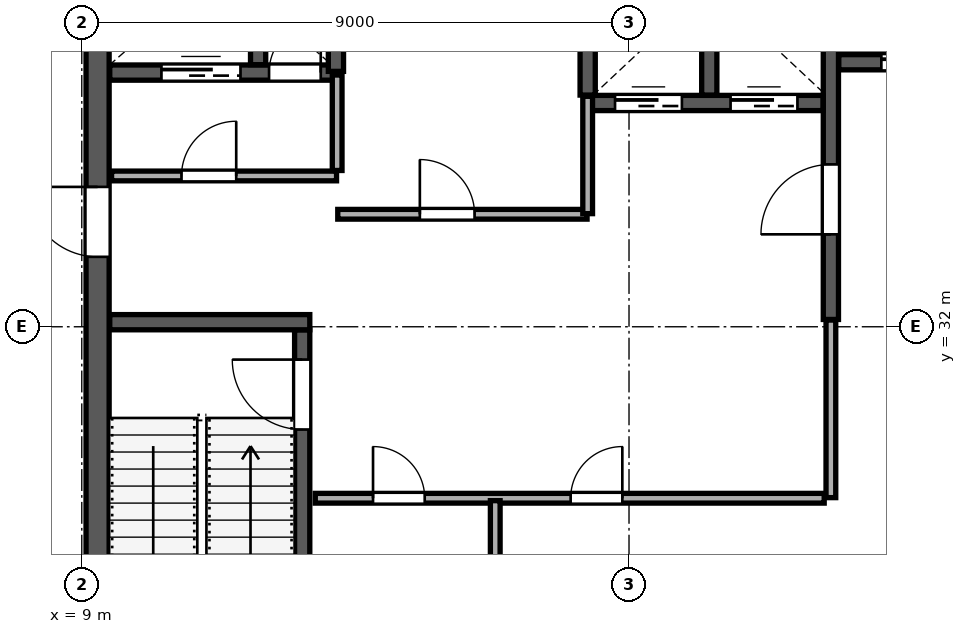
"""IFC4 building model, lengths in metres.
Left out: names, types, materials, properties, quantities, classifications, styles, units other than length and angle.
Written with IfcOpenShell. Run it as: python <this file> out.ifc"""

import sys

from ifc_helpers import new_model, si_unit, direction, frame, frame_2d, origin, place, context, subcontext, project, spatial, rectangle, extrude, source, transform, mapped, element, fill, save


model = new_model("IFC4")
c1 = context("Model", 3, precision=1e-05, world=origin(), true_north=direction((0.0, 1.0)))
c2 = subcontext(c1, "Body", "Model", "MODEL_VIEW")
j1 = project(units=[si_unit("LENGTHUNIT", "METRE"), si_unit("PLANEANGLEUNIT", "RADIAN")], contexts=[c1])
p1 = place(None, origin())
s1 = spatial("IfcSite", under=j1, at=p1, CompositionType="ELEMENT")
p2 = place(p1, origin())
s2 = spatial("IfcBuilding", under=s1, at=p2, CompositionType="ELEMENT")
p3 = place(p2, frame((0.0, 0.0, 324.0)))
s3 = spatial("IfcBuildingStorey", under=s2, at=p3, CompositionType="ELEMENT", Elevation=324.0)
p4 = place(p3, frame((9.26, 24.45, 0.0), z_axis=(0.0, 0.0, 1.0), x_axis=(0.0, 1.0, 0.0)))
e1 = element("IfcWall", 1, at=p4, inside=s3, PredefinedType="SHEAR", context=c2, shape_type="SweptSolid", body=[
    extrude(rectangle(XDim=15.1, YDim=0.38, at=frame_2d((7.55, 0.0))), origin(), (0.0, 0.0, 1.0), 3.96),
])
p5 = place(p4, frame((8.7, 0.0, 0.0)))
e2 = element("IfcOpeningElement", 2, at=p5, cuts=e1, PredefinedType="OPENING", context=c2, shape_type="SweptSolid", body=[
    extrude(rectangle(XDim=1.15, YDim=2.2, at=frame_2d((0.575, 1.1))), frame((0.0, 0.2, 0.0), z_axis=(0.0, -1.0, 0.0), x_axis=(1.0, 0.0, 0.0)), (0.0, 0.0, 1.0), 0.4),
])
p6 = place(p3, frame((12.625, 24.46, 0.0), z_axis=(0.0, 0.0, 1.0), x_axis=(0.0, 1.0, 0.0)))
e3 = element("IfcWall", 3, at=p6, inside=s3, PredefinedType="SHEAR", context=c2, shape_type="SweptSolid", body=[
    extrude(rectangle(XDim=7.49, YDim=0.25, at=frame_2d((3.745, 0.0))), origin(), (0.0, 0.0, 1.0), 3.96),
])
p7 = place(p6, frame((5.85, 0.0, 0.0)))
e4 = element("IfcOpeningElement", 4, at=p7, cuts=e3, PredefinedType="OPENING", context=c2, shape_type="SweptSolid", body=[
    extrude(rectangle(XDim=1.15, YDim=2.2, at=frame_2d((0.575, 1.1))), frame((0.0, 0.135, 0.0), z_axis=(0.0, -1.0, 0.0), x_axis=(1.0, 0.0, 0.0)), (0.0, 0.0, 1.0), 0.27),
])
p8 = place(p3, frame((9.46, 32.075, 0.0), z_axis=(0.0, 0.0, 1.0), x_axis=(1.0, 0.0, 0.0)))
e5 = element("IfcWall", 5, at=p8, inside=s3, PredefinedType="SHEAR", context=c2, shape_type="SweptSolid", body=[
    extrude(rectangle(XDim=3.29, YDim=0.25, at=frame_2d((1.645, 0.0))), origin(), (0.0, 0.0, 1.0), 3.96),
])
p9 = place(p3, frame((21.32, 32.12, 0.0), z_axis=(0.0, 0.0, 1.0), x_axis=(0.0, 1.0, 0.0)))
e6 = element("IfcWall", 6, at=p9, inside=s3, PredefinedType="SHEAR", context=c2, shape_type="SweptSolid", body=[
    extrude(rectangle(XDim=7.42, YDim=0.25, at=frame_2d((3.71, 0.0))), origin(), (0.0, 0.0, 1.0), 3.96),
])
p10 = place(p9, frame((1.4, 0.0, 0.0)))
e7 = element("IfcOpeningElement", 7, at=p10, cuts=e6, PredefinedType="OPENING", context=c2, shape_type="SweptSolid", body=[
    extrude(rectangle(XDim=1.15, YDim=2.2, at=frame_2d((0.575, 1.1))), frame((0.0, 0.135, 0.0), z_axis=(0.0, -1.0, 0.0), x_axis=(1.0, 0.0, 0.0)), (0.0, 0.0, 1.0), 0.27),
])
p11 = place(p3, frame((9.46, 36.18, 0.0), z_axis=(0.0, 0.0, 1.0), x_axis=(1.0, 0.0, 0.0)))
e8 = element("IfcWall", 8, at=p11, inside=s3, PredefinedType="SHEAR", context=c2, shape_type="SweptSolid", body=[
    extrude(rectangle(XDim=3.79, YDim=0.25, at=frame_2d((1.895, 0.0))), origin(), (0.0, 0.0, 1.0), 3.96),
])
p12 = place(p11, frame((2.62, 0.0, 0.0)))
e9 = element("IfcOpeningElement", 9, at=p12, cuts=e8, PredefinedType="OPENING", context=c2, shape_type="SweptSolid", body=[
    extrude(rectangle(XDim=0.85, YDim=2.1, at=frame_2d((0.425, 1.05))), frame((0.0, 0.135, 0.0), z_axis=(0.0, -1.0, 0.0), x_axis=(1.0, 0.0, 0.0)), (0.0, 0.0, 1.0), 0.27),
])
p13 = place(p11, frame((0.85, 0.0, 0.0)))
e10 = element("IfcOpeningElement", 10, at=p13, cuts=e8, PredefinedType="OPENING", context=c2, shape_type="SweptSolid", body=[
    extrude(rectangle(XDim=1.3, YDim=2.25, at=frame_2d((0.65, 1.125))), frame((0.0, 0.135, 0.0), z_axis=(0.0, -1.0, 0.0), x_axis=(1.0, 0.0, 0.0)), (0.0, 0.0, 1.0), 0.27),
])
p14 = place(p3, frame((11.9, 36.31, 0.0), z_axis=(0.0, 0.0, 1.0), x_axis=(0.0, 1.0, 0.0)))
e11 = element("IfcWall", 11, at=p14, inside=s3, PredefinedType="SHEAR", context=c2, shape_type="SweptSolid", body=[
    extrude(rectangle(XDim=3.23, YDim=0.25, at=frame_2d((1.615, 0.0))), origin(), (0.0, 0.0, 1.0), 3.96),
])
p15 = place(p3, frame((21.45, 36.35, 0.0), z_axis=(0.0, 0.0, 1.0), x_axis=(1.0, 0.0, 0.0)))
e12 = element("IfcWall", 12, at=p15, inside=s3, PredefinedType="SHEAR", context=c2, shape_type="SweptSolid", body=[
    extrude(rectangle(XDim=5.09, YDim=0.25, at=frame_2d((2.545, 0.0))), origin(), (0.0, 0.0, 1.0), 3.96),
])
p16 = place(p15, frame((0.7, 0.0, 0.0)))
e13 = element("IfcOpeningElement", 13, at=p16, cuts=e12, PredefinedType="OPENING", context=c2, shape_type="SweptSolid", body=[
    extrude(rectangle(XDim=1.2, YDim=2.2, at=frame_2d((0.6, 1.1))), frame((0.0, 0.135, 0.0), z_axis=(0.0, -1.0, 0.0), x_axis=(1.0, 0.0, 0.0)), (0.0, 0.0, 1.0), 0.27),
])
p17 = place(p15, frame((3.25, 0.0, 0.0)))
e14 = element("IfcOpeningElement", 14, at=p17, cuts=e12, PredefinedType="OPENING", context=c2, shape_type="SweptSolid", body=[
    extrude(rectangle(XDim=1.2, YDim=2.2, at=frame_2d((0.6, 1.1))), frame((0.0, 0.135, 0.0), z_axis=(0.0, -1.0, 0.0), x_axis=(1.0, 0.0, 0.0)), (0.0, 0.0, 1.0), 0.27),
])
p18 = place(p3, frame((13.18, 36.2, 0.0), z_axis=(0.0, 0.0, 1.0), x_axis=(0.0, 1.0, 0.0)))
e15 = element("IfcWall", 15, at=p18, inside=s3, PredefinedType="SHEAR", context=c2, shape_type="SweptSolid", body=[
    extrude(rectangle(XDim=3.34, YDim=0.25, at=frame_2d((1.67, 0.0))), origin(), (0.0, 0.0, 1.0), 3.96),
])
p19 = place(p3, frame((17.32, 35.68, 0.0), z_axis=(0.0, 0.0, 1.0), x_axis=(1.0, 0.0, 0.0)))
e16 = element("IfcWall", 16, at=p19, inside=s3, PredefinedType="SHEAR", context=c2, shape_type="SweptSolid", body=[
    extrude(rectangle(XDim=3.87, YDim=0.25, at=frame_2d((1.935, 0.0))), origin(), (0.0, 0.0, 1.0), 3.96),
])
p20 = place(p19, frame((0.45, 0.0, 0.0)))
e17 = element("IfcOpeningElement", 17, at=p20, cuts=e16, PredefinedType="OPENING", context=c2, shape_type="SweptSolid", body=[
    extrude(rectangle(XDim=1.1, YDim=2.2, at=frame_2d((0.55, 1.1))), frame((0.0, 0.135, 0.0), z_axis=(0.0, -1.0, 0.0), x_axis=(1.0, 0.0, 0.0)), (0.0, 0.0, 1.0), 0.27),
])
p21 = place(p19, frame((2.35, 0.0, 0.0)))
e18 = element("IfcOpeningElement", 18, at=p21, cuts=e16, PredefinedType="OPENING", context=c2, shape_type="SweptSolid", body=[
    extrude(rectangle(XDim=1.1, YDim=2.2, at=frame_2d((0.55, 1.1))), frame((0.0, 0.135, 0.0), z_axis=(0.0, -1.0, 0.0), x_axis=(1.0, 0.0, 0.0)), (0.0, 0.0, 1.0), 0.27),
])
for number, where, z_axis, x_axis in (
    (19, (17.32, 35.81, 0.0), (0.0, 0.0, 1.0), (0.0, 1.0, 0.0)),
    (20, (19.32, 35.81, 0.0), (0.0, 0.0, 1.0), (0.0, 1.0, 0.0)),
):
    element("IfcWall", number, at=place(p3, frame(where, z_axis=z_axis, x_axis=x_axis)), inside=s3, PredefinedType="SHEAR", context=c2, shape_type="SweptSolid", body=[
        extrude(rectangle(XDim=3.73, YDim=0.25, at=frame_2d((1.865, 0.0))), origin(), (0.0, 0.0, 1.0), 3.96),
    ])
p22 = place(p3, frame((9.49, 34.48, 0.0), z_axis=(0.0, 0.0, 1.0), x_axis=(1.0, 0.0, 0.0)))
e21 = element("IfcWall", 21, at=p22, inside=s3, PredefinedType="PARTITIONING", context=c2, shape_type="SweptSolid", body=[
    extrude(rectangle(XDim=3.7, YDim=0.16, at=frame_2d((1.85, 0.0))), origin(), (0.0, 0.0, 1.0), 3.96),
])
p23 = place(p22, frame((1.15, 0.0, 0.0)))
e22 = element("IfcOpeningElement", 22, at=p23, cuts=e21, PredefinedType="OPENING", context=c2, shape_type="SweptSolid", body=[
    extrude(rectangle(XDim=0.9, YDim=2.15, at=frame_2d((0.45, 1.075))), frame((0.0, 0.09, 0.0), z_axis=(0.0, -1.0, 0.0), x_axis=(1.0, 0.0, 0.0)), (0.0, 0.0, 1.0), 0.18),
])
p24 = place(p3, frame((13.2, 34.57, 0.0), z_axis=(0.0, 0.0, 1.0), x_axis=(0.0, 1.0, 0.0)))
e23 = element("IfcWall", 23, at=p24, inside=s3, PredefinedType="PARTITIONING", context=c2, shape_type="SweptSolid", body=[
    extrude(rectangle(XDim=1.57, YDim=0.16, at=frame_2d((0.785, 0.0))), origin(), (0.0, 0.0, 1.0), 3.96),
])
p25 = place(p3, frame((13.21, 33.85, 0.0), z_axis=(0.0, 0.0, 1.0), x_axis=(1.0, 0.0, 0.0)))
e24 = element("IfcWall", 24, at=p25, inside=s3, PredefinedType="PARTITIONING", context=c2, shape_type="SweptSolid", body=[
    extrude(rectangle(XDim=4.1, YDim=0.16, at=frame_2d((2.05, 0.0))), origin(), (0.0, 0.0, 1.0), 3.96),
])
p26 = place(p25, frame((1.35, 0.0, 0.0)))
e25 = element("IfcOpeningElement", 25, at=p26, cuts=e24, PredefinedType="OPENING", context=c2, shape_type="SweptSolid", body=[
    extrude(rectangle(XDim=0.9, YDim=2.15, at=frame_2d((0.45, 1.075))), frame((0.0, 0.09, 0.0), z_axis=(0.0, -1.0, 0.0), x_axis=(1.0, 0.0, 0.0)), (0.0, 0.0, 1.0), 0.18),
])
p27 = place(p3, frame((17.32, 33.86, 0.0), z_axis=(0.0, 0.0, 1.0), x_axis=(0.0, 1.0, 0.0)))
e26 = element("IfcWall", 26, at=p27, inside=s3, PredefinedType="PARTITIONING", context=c2, shape_type="SweptSolid", body=[
    extrude(rectangle(XDim=1.93, YDim=0.16, at=frame_2d((0.965, 0.0))), origin(), (0.0, 0.0, 1.0), 3.96),
])
p28 = place(p3, frame((12.84, 29.18, 0.0), z_axis=(0.0, 0.0, 1.0), x_axis=(1.0, 0.0, 0.0)))
e27 = element("IfcWall", 27, at=p28, inside=s3, PredefinedType="PARTITIONING", context=c2, shape_type="SweptSolid", body=[
    extrude(rectangle(XDim=8.37, YDim=0.16, at=frame_2d((4.185, 0.0))), origin(), (0.0, 0.0, 1.0), 3.96),
])
p29 = place(p28, frame((0.95, 0.0, 0.0)))
e28 = element("IfcOpeningElement", 28, at=p29, cuts=e27, PredefinedType="OPENING", context=c2, shape_type="SweptSolid", body=[
    extrude(rectangle(XDim=0.85, YDim=2.1, at=frame_2d((0.425, 1.05))), frame((0.0, 0.09, 0.0), z_axis=(0.0, -1.0, 0.0), x_axis=(1.0, 0.0, 0.0)), (0.0, 0.0, 1.0), 0.18),
])
p30 = place(p28, frame((4.2, 0.0, 0.0)))
e29 = element("IfcOpeningElement", 29, at=p30, cuts=e27, PredefinedType="OPENING", context=c2, shape_type="SweptSolid", body=[
    extrude(rectangle(XDim=0.85, YDim=2.1, at=frame_2d((0.425, 1.05))), frame((0.0, 0.09, 0.0), z_axis=(0.0, -1.0, 0.0), x_axis=(1.0, 0.0, 0.0)), (0.0, 0.0, 1.0), 0.18),
])
p31 = place(p3, frame((15.8, 24.54, 0.0), z_axis=(0.0, 0.0, 1.0), x_axis=(0.0, 1.0, 0.0)))
e30 = element("IfcWall", 30, at=p31, inside=s3, PredefinedType="PARTITIONING", context=c2, shape_type="SweptSolid", body=[
    extrude(rectangle(XDim=4.6, YDim=0.16, at=frame_2d((2.3, 0.0))), origin(), (0.0, 0.0, 1.0), 3.96),
])
p32 = place(p3, frame((21.32, 29.19, 0.0), z_axis=(0.0, 0.0, 1.0), x_axis=(0.0, 1.0, 0.0)))
e31 = element("IfcWall", 31, at=p32, inside=s3, PredefinedType="PARTITIONING", context=c2, shape_type="SweptSolid", body=[
    extrude(rectangle(XDim=2.92, YDim=0.16, at=frame_2d((1.46, 0.0))), origin(), (0.0, 0.0, 1.0), 3.96),
])
p33 = place(p3, frame((3.742, 32.498, 0.0), z_axis=(0.0, 0.0, 1.0), x_axis=(0.500005830994, -0.866022037233, 0.0)))
e32 = element("IfcWall", 32, at=p33, inside=s3, PredefinedType="PARTITIONING", context=c2, shape_type="SweptSolid", body=[
    extrude(rectangle(XDim=14.07, YDim=0.16, at=frame_2d((7.035, 0.0))), origin(), (0.0, 0.0, 1.0), 3.96),
])
p34 = place(p33, frame((1.15, 0.0, 0.0)))
e33 = element("IfcOpeningElement", 33, at=p34, cuts=e32, PredefinedType="OPENING", context=c2, shape_type="SweptSolid", body=[
    extrude(rectangle(XDim=0.95, YDim=2.15, at=frame_2d((0.475, 1.075))), frame((0.0, 0.09, 0.0), z_axis=(0.0, -1.0, 0.0), x_axis=(1.0, 0.0, 0.0)), (0.0, 0.0, 1.0), 0.18),
])
m1 = source(origin(), c2, "Body", "SweptSolid", [
    extrude(rectangle(XDim=1.15, YDim=2.2, at=frame_2d((0.575, 1.1))), frame((0.0, 0.025, 0.0), z_axis=(0.0, -1.0, 0.0), x_axis=(1.0, 0.0, 0.0)), (0.0, 0.0, 1.0), 0.05),
])
p35 = place(p7, origin())
e34 = element("IfcDoor", 34, at=p35, inside=s3, OperationType="SINGLE_SWING_RIGHT", PredefinedType="DOOR", context=c2, shape_type="MappedRepresentation", body=[
    mapped(m1, transform((0.0, 0.0, 0.0), scale=1.0)),
])
fill(e4, e34)
m2 = source(origin(), c2, "Body", "SweptSolid", [
    extrude(rectangle(XDim=1.15, YDim=2.2, at=frame_2d((0.575, 1.1))), frame((0.0, 0.025, 0.0), z_axis=(0.0, -1.0, 0.0), x_axis=(1.0, 0.0, 0.0)), (0.0, 0.0, 1.0), 0.05),
])
p36 = place(p10, origin())
e35 = element("IfcDoor", 35, at=p36, inside=s3, OperationType="SINGLE_SWING_LEFT", PredefinedType="DOOR", context=c2, shape_type="MappedRepresentation", body=[
    mapped(m2, transform((0.0, 0.0, 0.0), scale=1.0)),
])
fill(e7, e35)
p37 = place(p5, origin())
e36 = element("IfcDoor", 36, at=p37, inside=s3, OperationType="SINGLE_SWING_RIGHT", PredefinedType="DOOR", context=c2, shape_type="MappedRepresentation", body=[
    mapped(m2, transform((0.0, 0.0, 0.0), scale=1.0)),
])
fill(e2, e36)
m3 = source(origin(), c2, "Body", "SweptSolid", [
    extrude(rectangle(XDim=0.85, YDim=2.1, at=frame_2d((0.425, 1.05))), frame((0.0, 0.025, 0.0), z_axis=(0.0, -1.0, 0.0), x_axis=(1.0, 0.0, 0.0)), (0.0, 0.0, 1.0), 0.05),
])
p38 = place(p12, origin())
e37 = element("IfcDoor", 37, at=p38, inside=s3, OperationType="SINGLE_SWING_RIGHT", PredefinedType="DOOR", context=c2, shape_type="MappedRepresentation", body=[
    mapped(m3, transform((0.0, 0.0, 0.0), scale=1.0)),
])
fill(e9, e37)
m4 = source(origin(), c2, "Body", "SweptSolid", [
    extrude(rectangle(XDim=1.1, YDim=2.2, at=frame_2d((0.55, 1.1))), frame((0.0, 0.025, 0.0), z_axis=(0.0, -1.0, 0.0), x_axis=(1.0, 0.0, 0.0)), (0.0, 0.0, 1.0), 0.05),
])
p39 = place(p20, origin())
e38 = element("IfcDoor", 38, at=p39, inside=s3, OperationType="SLIDING_TO_LEFT", PredefinedType="DOOR", context=c2, shape_type="MappedRepresentation", body=[
    mapped(m4, transform((0.0, 0.0, 0.0), scale=1.0)),
])
fill(e17, e38)
p40 = place(p21, origin())
e39 = element("IfcDoor", 39, at=p40, inside=s3, OperationType="SLIDING_TO_RIGHT", PredefinedType="DOOR", context=c2, shape_type="MappedRepresentation", body=[
    mapped(m4, transform((0.0, 0.0, 0.0), scale=1.0)),
])
fill(e18, e39)
m5 = source(origin(), c2, "Body", "SweptSolid", [
    extrude(rectangle(XDim=1.2, YDim=2.2, at=frame_2d((0.6, 1.1))), frame((0.0, 0.025, 0.0), z_axis=(0.0, -1.0, 0.0), x_axis=(1.0, 0.0, 0.0)), (0.0, 0.0, 1.0), 0.05),
])
p41 = place(p16, origin())
e40 = element("IfcDoor", 40, at=p41, inside=s3, OperationType="SLIDING_TO_LEFT", PredefinedType="DOOR", context=c2, shape_type="MappedRepresentation", body=[
    mapped(m5, transform((0.0, 0.0, 0.0), scale=1.0)),
])
fill(e13, e40)
m6 = source(origin(), c2, "Body", "SweptSolid", [
    extrude(rectangle(XDim=1.3, YDim=2.25, at=frame_2d((0.65, 1.125))), frame((0.0, 0.025, 0.0), z_axis=(0.0, -1.0, 0.0), x_axis=(1.0, 0.0, 0.0)), (0.0, 0.0, 1.0), 0.05),
])
p42 = place(p13, origin())
e41 = element("IfcDoor", 41, at=p42, inside=s3, OperationType="SLIDING_TO_LEFT", PredefinedType="DOOR", context=c2, shape_type="MappedRepresentation", body=[
    mapped(m6, transform((0.0, 0.0, 0.0), scale=1.0)),
])
fill(e10, e41)
m7 = source(origin(), c2, "Body", "SweptSolid", [
    extrude(rectangle(XDim=0.9, YDim=2.15, at=frame_2d((0.45, 1.075))), frame((0.0, 0.025, 0.0), z_axis=(0.0, -1.0, 0.0), x_axis=(1.0, 0.0, 0.0)), (0.0, 0.0, 1.0), 0.05),
])
p43 = place(p23, origin())
e42 = element("IfcDoor", 42, at=p43, inside=s3, OperationType="SINGLE_SWING_RIGHT", PredefinedType="DOOR", context=c2, shape_type="MappedRepresentation", body=[
    mapped(m7, transform((0.0, 0.0, 0.0), scale=1.0)),
])
fill(e22, e42)
p44 = place(p26, origin())
e43 = element("IfcDoor", 43, at=p44, inside=s3, OperationType="SINGLE_SWING_LEFT", PredefinedType="DOOR", context=c2, shape_type="MappedRepresentation", body=[
    mapped(m7, transform((0.0, 0.0, 0.0), scale=1.0)),
])
fill(e25, e43)
p45 = place(p29, origin())
e44 = element("IfcDoor", 44, at=p45, inside=s3, OperationType="SINGLE_SWING_LEFT", PredefinedType="DOOR", context=c2, shape_type="MappedRepresentation", body=[
    mapped(m3, transform((0.0, 0.0, 0.0), scale=1.0)),
])
fill(e28, e44)
p46 = place(p30, origin())
e45 = element("IfcDoor", 45, at=p46, inside=s3, OperationType="SINGLE_SWING_RIGHT", PredefinedType="DOOR", context=c2, shape_type="MappedRepresentation", body=[
    mapped(m3, transform((0.0, 0.0, 0.0), scale=1.0)),
])
fill(e29, e45)
save(model, sys.argv[1])
